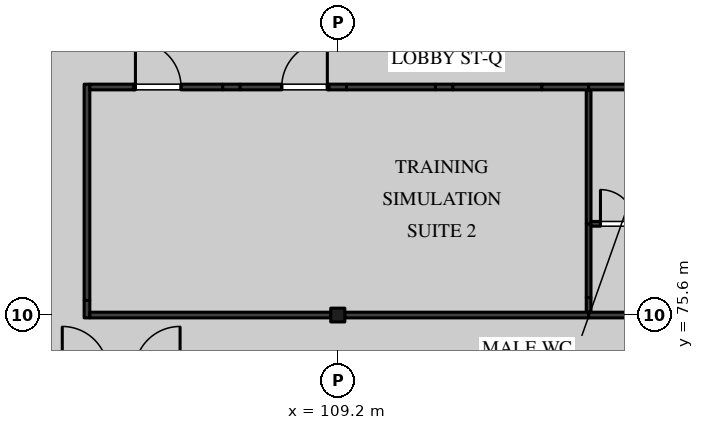
"""IFC4 building model, lengths in metres.
Left out: names, types, materials, properties, quantities, classifications, styles, units other than length and angle.
Written with IfcOpenShell. Run it as: python <this file> out.ifc"""

import sys

from ifc_helpers import new_model, si_unit, direction, frame, frame_2d, origin, origin_2d, place, context, subcontext, project, spatial, rectangle, i_section, extrude, element, fill, save


model = new_model("IFC4")
c1 = context("Model", 3, precision=1e-05, world=origin(), true_north=direction((0.0, 1.0)))
c2 = subcontext(c1, "Body", "Model", "MODEL_VIEW")
j1 = project(units=[si_unit("LENGTHUNIT", "METRE"), si_unit("PLANEANGLEUNIT", "RADIAN")], contexts=[c1])
p1 = place(None, origin())
s1 = spatial("IfcSite", under=j1, at=p1, CompositionType="ELEMENT")
p2 = place(p1, origin())
s2 = spatial("IfcBuilding", under=s1, at=p2, CompositionType="ELEMENT")
p3 = place(p2, frame((0.0, 0.0, 14.4)))
s3 = spatial("IfcBuildingStorey", under=s2, at=p3, CompositionType="ELEMENT", Elevation=14.4)
p4 = place(p3, frame((109.2, 75.6, 0.0), z_axis=(0.0, 0.0, 1.0), x_axis=(1.0, 0.0, 0.0)))
e1 = element("IfcColumn", 1, at=p4, inside=s3, PredefinedType="COLUMN", context=c2, shape_type="SweptSolid", body=[
    extrude(i_section(OverallWidth=0.371, OverallDepth=0.363, WebThickness=0.013, FlangeThickness=0.022, FilletRadius=0.015, at=origin_2d()), origin(), (0.0, 0.0, 1.0), 4.37),
])
p5 = place(p3, frame((115.8, 75.675, 0.0), z_axis=(0.0, 0.0, 1.0), x_axis=(0.0, 1.0, 0.0)))
e2 = element("IfcWall", 2, at=p5, inside=s3, PredefinedType="PARTITIONING", context=c2, shape_type="SweptSolid", body=[
    extrude(rectangle(XDim=0.385, YDim=0.125, at=frame_2d((0.192, 0.0))), origin(), (0.0, 0.0, 1.0), 3.746),
])
p6 = place(p3, frame((115.8, 76.06, 0.0), z_axis=(0.0, 0.0, 1.0), x_axis=(0.0, 1.0, 0.0)))
e3 = element("IfcWall", 3, at=p6, inside=s3, PredefinedType="PARTITIONING", context=c2, shape_type="SweptSolid", body=[
    extrude(rectangle(XDim=1.94, YDim=0.125, at=frame_2d((0.97, 0.0))), origin(), (0.0, 0.0, 1.0), 4.37),
])
p7 = place(p3, frame((115.8, 78.0, 0.0), z_axis=(0.0, 0.0, 1.0), x_axis=(0.0, 1.0, 0.0)))
e4 = element("IfcWall", 4, at=p7, inside=s3, PredefinedType="PARTITIONING", context=c2, shape_type="SweptSolid", body=[
    extrude(rectangle(XDim=3.525, YDim=0.125, at=frame_2d((1.762, 0.0))), origin(), (0.0, 0.0, 1.0), 4.37),
])
p8 = place(p3, frame((102.6, 75.525, 0.0), z_axis=(0.0, 0.0, 1.0), x_axis=(0.0, 1.0, 0.0)))
e5 = element("IfcWall", 5, at=p8, inside=s3, PredefinedType="PARTITIONING", context=c2, shape_type="SweptSolid", body=[
    extrude(rectangle(XDim=0.46, YDim=0.15, at=frame_2d((0.23, 0.0))), origin(), (0.0, 0.0, 1.0), 3.746),
])
p9 = place(p3, frame((102.6, 75.985, 0.0), z_axis=(0.0, 0.0, 1.0), x_axis=(0.0, 1.0, 0.0)))
e6 = element("IfcWall", 6, at=p9, inside=s3, PredefinedType="PARTITIONING", context=c2, shape_type="SweptSolid", body=[
    extrude(rectangle(XDim=5.69, YDim=0.15, at=frame_2d((2.845, 0.0))), origin(), (0.0, 0.0, 1.0), 4.37),
])
p10 = place(p3, frame((102.675, 75.6, 0.0), z_axis=(0.0, 0.0, 1.0), x_axis=(1.0, 0.0, 0.0)))
e7 = element("IfcWall", 7, at=p10, inside=s3, PredefinedType="PARTITIONING", context=c2, shape_type="SweptSolid", body=[
    extrude(rectangle(XDim=6.339, YDim=0.15, at=frame_2d((3.169, 0.0))), origin(), (0.0, 0.0, 1.0), 3.746),
])
p11 = place(p3, frame((109.386, 75.6, 0.0), z_axis=(0.0, 0.0, 1.0), x_axis=(1.0, 0.0, 0.0)))
e8 = element("IfcWall", 8, at=p11, inside=s3, PredefinedType="PARTITIONING", context=c2, shape_type="SweptSolid", body=[
    extrude(rectangle(XDim=6.414, YDim=0.15, at=frame_2d((3.207, 0.0))), origin(), (0.0, 0.0, 1.0), 3.746),
])
p12 = place(p3, frame((102.675, 81.6, 0.0), z_axis=(0.0, 0.0, 1.0), x_axis=(1.0, 0.0, 0.0)))
e9 = element("IfcWall", 9, at=p12, inside=s3, PredefinedType="PARTITIONING", context=c2, shape_type="SweptSolid", body=[
    extrude(rectangle(XDim=1.155, YDim=0.15, at=frame_2d((0.578, 0.0))), origin(), (0.0, 0.0, 1.0), 3.895),
])
p13 = place(p3, frame((103.83, 81.6, 0.0), z_axis=(0.0, 0.0, 1.0), x_axis=(1.0, 0.0, 0.0)))
e10 = element("IfcWall", 10, at=p13, inside=s3, PredefinedType="PARTITIONING", context=c2, shape_type="SweptSolid", body=[
    extrude(rectangle(XDim=2.34, YDim=0.15, at=frame_2d((1.17, 0.0))), origin(), (0.0, 0.0, 1.0), 4.37),
])
p14 = place(p13, frame((0.045, 0.0, 0.0)))
e11 = element("IfcOpeningElement", 11, at=p14, cuts=e10, PredefinedType="OPENING", context=c2, shape_type="SweptSolid", body=[
    extrude(rectangle(XDim=1.2, YDim=2.4, at=frame_2d((0.6, 1.2))), frame((0.0, 0.085, 0.0), z_axis=(0.0, -1.0, 0.0), x_axis=(1.0, 0.0, 0.0)), (0.0, 0.0, 1.0), 0.17),
])
p15 = place(p3, frame((106.17, 81.6, 0.0), z_axis=(0.0, 0.0, 1.0), x_axis=(1.0, 0.0, 0.0)))
e12 = element("IfcWall", 12, at=p15, inside=s3, PredefinedType="PARTITIONING", context=c2, shape_type="SweptSolid", body=[
    extrude(rectangle(XDim=0.46, YDim=0.15, at=frame_2d((0.23, 0.0))), origin(), (0.0, 0.0, 1.0), 3.895),
])
p16 = place(p3, frame((106.63, 81.6, 0.0), z_axis=(0.0, 0.0, 1.0), x_axis=(1.0, 0.0, 0.0)))
e13 = element("IfcWall", 13, at=p16, inside=s3, PredefinedType="PARTITIONING", context=c2, shape_type="SweptSolid", body=[
    extrude(rectangle(XDim=2.34, YDim=0.15, at=frame_2d((1.17, 0.0))), origin(), (0.0, 0.0, 1.0), 4.37),
])
p17 = place(p16, frame((1.095, 0.0, 0.0)))
e14 = element("IfcOpeningElement", 14, at=p17, cuts=e13, PredefinedType="OPENING", context=c2, shape_type="SweptSolid", body=[
    extrude(rectangle(XDim=1.2, YDim=2.4, at=frame_2d((0.6, 1.2))), frame((0.0, 0.085, 0.0), z_axis=(0.0, -1.0, 0.0), x_axis=(1.0, 0.0, 0.0)), (0.0, 0.0, 1.0), 0.17),
])
p18 = place(p3, frame((108.97, 81.6, 0.0), z_axis=(0.0, 0.0, 1.0), x_axis=(1.0, 0.0, 0.0)))
e15 = element("IfcWall", 15, at=p18, inside=s3, PredefinedType="PARTITIONING", context=c2, shape_type="SweptSolid", body=[
    extrude(rectangle(XDim=0.46, YDim=0.15, at=frame_2d((0.23, 0.0))), origin(), (0.0, 0.0, 1.0), 3.746),
])
p19 = place(p3, frame((109.43, 81.6, 0.0), z_axis=(0.0, 0.0, 1.0), x_axis=(1.0, 0.0, 0.0)))
e16 = element("IfcWall", 16, at=p19, inside=s3, PredefinedType="PARTITIONING", context=c2, shape_type="SweptSolid", body=[
    extrude(rectangle(XDim=2.34, YDim=0.15, at=frame_2d((1.17, 0.0))), origin(), (0.0, 0.0, 1.0), 4.37),
])
p20 = place(p3, frame((111.77, 81.6, 0.0), z_axis=(0.0, 0.0, 1.0), x_axis=(1.0, 0.0, 0.0)))
e17 = element("IfcWall", 17, at=p20, inside=s3, PredefinedType="PARTITIONING", context=c2, shape_type="SweptSolid", body=[
    extrude(rectangle(XDim=0.46, YDim=0.15, at=frame_2d((0.23, 0.0))), origin(), (0.0, 0.0, 1.0), 3.895),
])
p21 = place(p3, frame((112.23, 81.6, 0.0), z_axis=(0.0, 0.0, 1.0), x_axis=(1.0, 0.0, 0.0)))
e18 = element("IfcWall", 18, at=p21, inside=s3, PredefinedType="PARTITIONING", context=c2, shape_type="SweptSolid", body=[
    extrude(rectangle(XDim=2.34, YDim=0.15, at=frame_2d((1.17, 0.0))), origin(), (0.0, 0.0, 1.0), 4.37),
])
p22 = place(p3, frame((114.57, 81.6, 0.0), z_axis=(0.0, 0.0, 1.0), x_axis=(1.0, 0.0, 0.0)))
e19 = element("IfcWall", 19, at=p22, inside=s3, PredefinedType="PARTITIONING", context=c2, shape_type="SweptSolid", body=[
    extrude(rectangle(XDim=1.23, YDim=0.15, at=frame_2d((0.615, 0.0))), origin(), (0.0, 0.0, 1.0), 3.895),
])
p23 = place(p3, frame((115.862, 78.0, 0.0), z_axis=(0.0, 0.0, 1.0), x_axis=(1.0, 0.0, 0.0)))
e20 = element("IfcWall", 20, at=p23, inside=s3, PredefinedType="PARTITIONING", context=c2, shape_type="SweptSolid", body=[
    extrude(rectangle(XDim=1.545, YDim=0.125, at=frame_2d((0.772, 0.0))), origin(), (0.0, 0.0, 1.0), 4.37),
])
p24 = place(p23, frame((0.25, 0.0, 0.0)))
e21 = element("IfcOpeningElement", 21, at=p24, cuts=e20, PredefinedType="OPENING", context=c2, shape_type="SweptSolid", body=[
    extrude(rectangle(XDim=0.9, YDim=2.1, at=frame_2d((0.45, 1.05))), frame((0.0, 0.073, 0.0), z_axis=(0.0, -1.0, 0.0), x_axis=(1.0, 0.0, 0.0)), (0.0, 0.0, 1.0), 0.145),
])
p25 = place(p3, frame((115.8, 75.6, 0.0), z_axis=(0.0, 0.0, 1.0), x_axis=(1.0, 0.0, 0.0)))
e22 = element("IfcWall", 22, at=p25, inside=s3, PredefinedType="PARTITIONING", context=c2, shape_type="SweptSolid", body=[
    extrude(rectangle(XDim=1.614, YDim=0.15, at=frame_2d((0.807, 0.0))), origin(), (0.0, 0.0, 1.0), 3.746),
])
p26 = place(p3, frame((115.8, 81.6, 0.0), z_axis=(0.0, 0.0, 1.0), x_axis=(1.0, 0.0, 0.0)))
e23 = element("IfcWall", 23, at=p26, inside=s3, PredefinedType="PARTITIONING", context=c2, shape_type="SweptSolid", body=[
    extrude(rectangle(XDim=1.57, YDim=0.15, at=frame_2d((0.785, 0.0))), origin(), (0.0, 0.0, 1.0), 4.37),
])
p27 = place(p14, origin())
e24 = element("IfcDoor", 24, at=p27, inside=s3, OperationType="SINGLE_SWING_RIGHT", PredefinedType="DOOR", context=c2, shape_type="SweptSolid", body=[
    extrude(rectangle(XDim=1.2, YDim=2.4, at=frame_2d((0.6, 1.2))), frame((0.0, 0.025, 0.0), z_axis=(0.0, -1.0, 0.0), x_axis=(1.0, 0.0, 0.0)), (0.0, 0.0, 1.0), 0.05),
])
fill(e11, e24)
p28 = place(p17, origin())
e25 = element("IfcDoor", 25, at=p28, inside=s3, OperationType="SINGLE_SWING_LEFT", PredefinedType="DOOR", context=c2, shape_type="SweptSolid", body=[
    extrude(rectangle(XDim=1.2, YDim=2.4, at=frame_2d((0.6, 1.2))), frame((0.0, 0.025, 0.0), z_axis=(0.0, -1.0, 0.0), x_axis=(1.0, 0.0, 0.0)), (0.0, 0.0, 1.0), 0.05),
])
fill(e14, e25)
p29 = place(p24, origin())
e26 = element("IfcDoor", 26, at=p29, inside=s3, OperationType="SINGLE_SWING_RIGHT", PredefinedType="DOOR", context=c2, shape_type="SweptSolid", body=[
    extrude(rectangle(XDim=0.9, YDim=2.1, at=frame_2d((0.45, 1.05))), frame((0.0, 0.02, 0.0), z_axis=(0.0, -1.0, 0.0), x_axis=(1.0, 0.0, 0.0)), (0.0, 0.0, 1.0), 0.04),
])
fill(e21, e26)
save(model, sys.argv[1])
